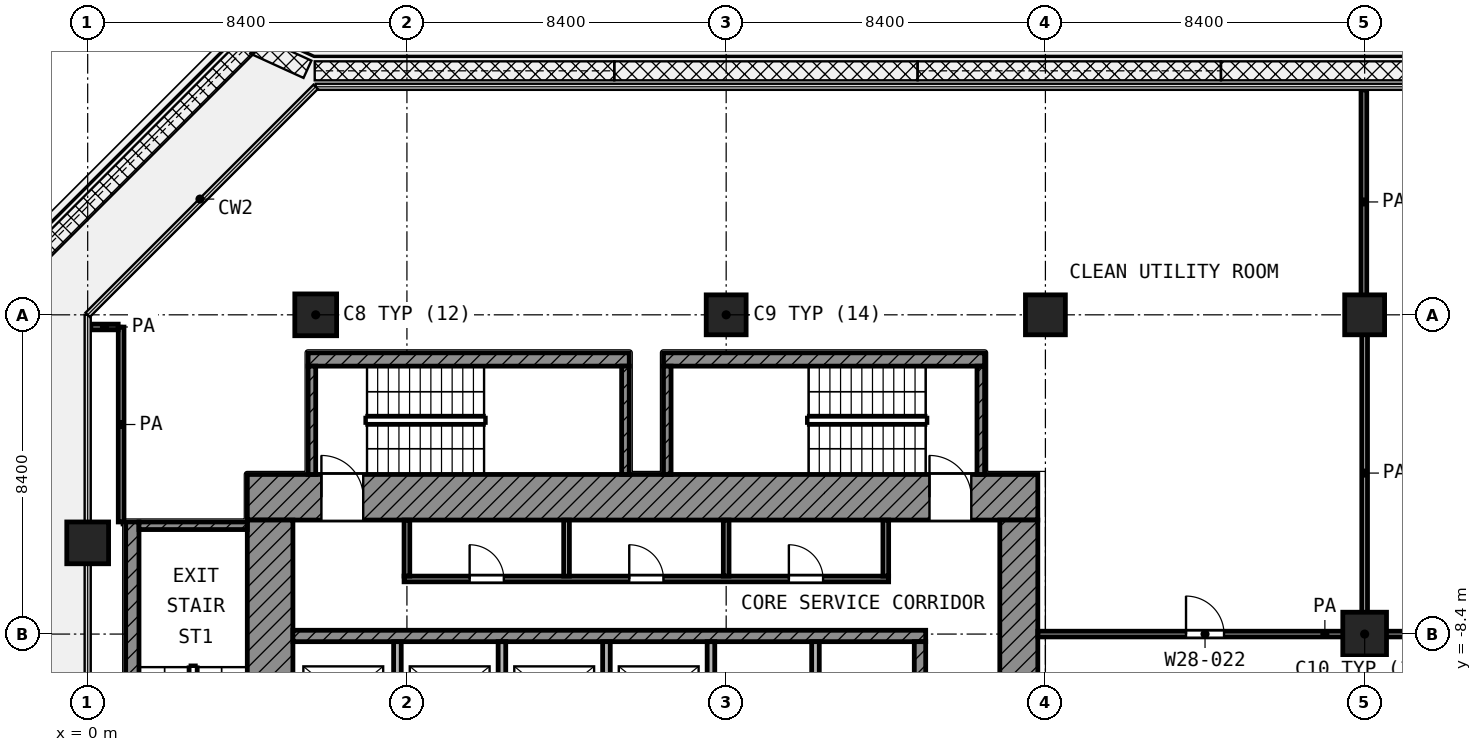
"""IFC4 building model, lengths in metres.
Left out: names, types, materials, properties, quantities, classifications, styles, units other than length and angle.
Written with IfcOpenShell. Run it as: python <this file> out.ifc"""

import sys

from ifc_helpers import new_model, si_unit, direction, frame, frame_2d, origin, origin_2d, place, context, subcontext, project, spatial, rectangle, extrude, element, fill, save


model = new_model("IFC4")
c1 = context("Model", 3, precision=1e-05, world=origin(), true_north=direction((0.0, 1.0)))
c2 = subcontext(c1, "Body", "Model", "MODEL_VIEW")
j1 = project(units=[si_unit("LENGTHUNIT", "METRE"), si_unit("PLANEANGLEUNIT", "RADIAN")], contexts=[c1])
p1 = place(None, origin())
s1 = spatial("IfcSite", under=j1, at=p1, CompositionType="ELEMENT")
p2 = place(p1, origin())
s2 = spatial("IfcBuilding", under=s1, at=p2, CompositionType="ELEMENT")
p3 = place(p2, frame((0.0, 0.0, 124.0)))
s3 = spatial("IfcBuildingStorey", under=s2, at=p3, CompositionType="ELEMENT", Elevation=124.0)
p4 = place(p3, frame((6.0, 0.0, 0.0), z_axis=(0.0, 0.0, 1.0), x_axis=(1.0, 0.0, 0.0)))
e1 = element("IfcColumn", 1, at=p4, inside=s3, PredefinedType="COLUMN", context=c2, shape_type="SweptSolid", body=[
    extrude(rectangle(XDim=1.1, YDim=1.1, at=origin_2d()), origin(), (0.0, 0.0, 1.0), 4.2),
])
for number, where, z_axis, x_axis in (
    (2, (16.8, 0.0, 0.0), (0.0, 0.0, 1.0), (1.0, 0.0, 0.0)),
    (3, (25.2, 0.0, 0.0), (0.0, 0.0, 1.0), (1.0, 0.0, 0.0)),
    (4, (33.6, 0.0, 0.0), (0.0, 0.0, 1.0), (1.0, 0.0, 0.0)),
):
    element("IfcColumn", number, at=place(p3, frame(where, z_axis=z_axis, x_axis=x_axis)), inside=s3, PredefinedType="COLUMN", context=c2, shape_type="SweptSolid", body=[
        extrude(rectangle(XDim=1.05, YDim=1.05, at=origin_2d()), origin(), (0.0, 0.0, 1.0), 4.2),
    ])
p5 = place(p3, frame((0.0, -6.0, 0.0), z_axis=(0.0, 0.0, 1.0), x_axis=(1.0, 0.0, 0.0)))
e5 = element("IfcColumn", 5, at=p5, inside=s3, PredefinedType="COLUMN", context=c2, shape_type="SweptSolid", body=[
    extrude(rectangle(XDim=1.1, YDim=1.1, at=origin_2d()), origin(), (0.0, 0.0, 1.0), 4.2),
])
p6 = place(p3, frame((33.6, -8.4, 0.0), z_axis=(0.0, 0.0, 1.0), x_axis=(1.0, 0.0, 0.0)))
e6 = element("IfcColumn", 6, at=p6, inside=s3, PredefinedType="COLUMN", context=c2, shape_type="SweptSolid", body=[
    extrude(rectangle(XDim=1.15, YDim=1.15, at=origin_2d()), origin(), (0.0, 0.0, 1.0), 4.2),
])
p7 = place(p3, frame((4.2, -4.8, 0.0), z_axis=(0.0, 0.0, 1.0), x_axis=(1.0, 0.0, 0.0)))
e7 = element("IfcWall", 7, at=p7, inside=s3, PredefinedType="SHEAR", context=c2, shape_type="SweptSolid", body=[
    extrude(rectangle(XDim=20.8, YDim=1.2, at=frame_2d((10.4, 0.0))), origin(), (0.0, 0.0, 1.0), 3.6),
])
p8 = place(p7, frame((1.95, 0.0, 0.0)))
e8 = element("IfcOpeningElement", 8, at=p8, cuts=e7, PredefinedType="OPENING", context=c2, shape_type="SweptSolid", body=[
    extrude(rectangle(XDim=1.1, YDim=2.1, at=frame_2d((0.55, 1.05))), frame((0.0, 0.61, 0.0), z_axis=(0.0, -1.0, 0.0), x_axis=(1.0, 0.0, 0.0)), (0.0, 0.0, 1.0), 1.22),
])
p9 = place(p7, frame((17.95, 0.0, 0.0)))
e9 = element("IfcOpeningElement", 9, at=p9, cuts=e7, PredefinedType="OPENING", context=c2, shape_type="SweptSolid", body=[
    extrude(rectangle(XDim=1.1, YDim=2.1, at=frame_2d((0.55, 1.05))), frame((0.0, 0.61, 0.0), z_axis=(0.0, -1.0, 0.0), x_axis=(1.0, 0.0, 0.0)), (0.0, 0.0, 1.0), 1.22),
])
p10 = place(p3, frame((4.8, -25.0, 0.0), z_axis=(0.0, 0.0, 1.0), x_axis=(0.0, 1.0, 0.0)))
e10 = element("IfcWall", 10, at=p10, inside=s3, PredefinedType="SHEAR", context=c2, shape_type="SweptSolid", body=[
    extrude(rectangle(XDim=19.6, YDim=1.2, at=frame_2d((9.8, 0.0))), origin(), (0.0, 0.0, 1.0), 3.6),
])
p11 = place(p10, frame((11.45, 0.0, 0.0)))
e11 = element("IfcOpeningElement", 11, at=p11, cuts=e10, PredefinedType="OPENING", context=c2, shape_type="SweptSolid", body=[
    extrude(rectangle(XDim=1.1, YDim=2.1, at=frame_2d((0.55, 1.05))), frame((0.0, 0.61, 0.0), z_axis=(0.0, -1.0, 0.0), x_axis=(1.0, 0.0, 0.0)), (0.0, 0.0, 1.0), 1.22),
])
p12 = place(p10, frame((2.15, 0.0, 0.0)))
e12 = element("IfcOpeningElement", 12, at=p12, cuts=e10, PredefinedType="OPENING", context=c2, shape_type="SweptSolid", body=[
    extrude(rectangle(XDim=1.1, YDim=2.1, at=frame_2d((0.55, 1.05))), frame((0.0, 0.61, 0.0), z_axis=(0.0, -1.0, 0.0), x_axis=(1.0, 0.0, 0.0)), (0.0, 0.0, 1.0), 1.22),
])
p13 = place(p3, frame((24.5, -24.0, 0.0), z_axis=(0.0, 0.0, 1.0), x_axis=(0.0, 1.0, 0.0)))
e13 = element("IfcWall", 13, at=p13, inside=s3, PredefinedType="SHEAR", context=c2, shape_type="SweptSolid", body=[
    extrude(rectangle(XDim=18.6, YDim=1.0, at=frame_2d((9.3, 0.0))), origin(), (0.0, 0.0, 1.0), 3.6),
])
p14 = place(p13, frame((10.5, 0.0, 0.0)))
e14 = element("IfcOpeningElement", 14, at=p14, cuts=e13, PredefinedType="OPENING", context=c2, shape_type="SweptSolid", body=[
    extrude(rectangle(XDim=1.8, YDim=2.1, at=frame_2d((0.9, 1.05))), frame((0.0, 0.51, 0.0), z_axis=(0.0, -1.0, 0.0), x_axis=(1.0, 0.0, 0.0)), (0.0, 0.0, 1.0), 1.02),
])
p15 = place(p3, frame((5.4, -8.45, 0.0), z_axis=(0.0, 0.0, 1.0), x_axis=(1.0, 0.0, 0.0)))
e15 = element("IfcWall", 15, at=p15, inside=s3, PredefinedType="SHEAR", context=c2, shape_type="SweptSolid", body=[
    extrude(rectangle(XDim=16.65, YDim=0.3, at=frame_2d((8.325, 0.0))), origin(), (0.0, 0.0, 1.0), 3.6),
])
p16 = place(p3, frame((21.9, -10.95, 0.0), z_axis=(0.0, 0.0, 1.0), x_axis=(0.0, 1.0, 0.0)))
e16 = element("IfcWall", 16, at=p16, inside=s3, PredefinedType="SHEAR", context=c2, shape_type="SweptSolid", body=[
    extrude(rectangle(XDim=2.35, YDim=0.3, at=frame_2d((1.175, 0.0))), origin(), (0.0, 0.0, 1.0), 3.6),
])
for number, where, z_axis, x_axis in (
    (17, (8.15, -10.95, 0.0), (0.0, 0.0, 1.0), (0.0, 1.0, 0.0)),
    (18, (10.9, -10.95, 0.0), (0.0, 0.0, 1.0), (0.0, 1.0, 0.0)),
    (19, (13.65, -10.95, 0.0), (0.0, 0.0, 1.0), (0.0, 1.0, 0.0)),
    (20, (16.4, -10.95, 0.0), (0.0, 0.0, 1.0), (0.0, 1.0, 0.0)),
    (21, (19.15, -10.95, 0.0), (0.0, 0.0, 1.0), (0.0, 1.0, 0.0)),
):
    element("IfcWall", number, at=place(p3, frame(where, z_axis=z_axis, x_axis=x_axis)), inside=s3, PredefinedType="PARTITIONING", context=c2, shape_type="SweptSolid", body=[
        extrude(rectangle(XDim=2.35, YDim=0.2, at=frame_2d((1.175, 0.0))), origin(), (0.0, 0.0, 1.0), 3.6),
    ])
p17 = place(p3, frame((8.325, -6.95, 0.0), z_axis=(0.0, 0.0, 1.0), x_axis=(1.0, 0.0, 0.0)))
e22 = element("IfcWall", 22, at=p17, inside=s3, PredefinedType="PARTITIONING", context=c2, shape_type="SweptSolid", body=[
    extrude(rectangle(XDim=12.75, YDim=0.15, at=frame_2d((6.375, 0.0))), origin(), (0.0, 0.0, 1.0), 3.6),
])
p18 = place(p17, frame((1.725, 0.0, 0.0)))
e23 = element("IfcOpeningElement", 23, at=p18, cuts=e22, PredefinedType="OPENING", context=c2, shape_type="SweptSolid", body=[
    extrude(rectangle(XDim=0.9, YDim=2.1, at=frame_2d((0.45, 1.05))), frame((0.0, 0.085, 0.0), z_axis=(0.0, -1.0, 0.0), x_axis=(1.0, 0.0, 0.0)), (0.0, 0.0, 1.0), 0.17),
])
p19 = place(p17, frame((5.925, 0.0, 0.0)))
e24 = element("IfcOpeningElement", 24, at=p19, cuts=e22, PredefinedType="OPENING", context=c2, shape_type="SweptSolid", body=[
    extrude(rectangle(XDim=0.9, YDim=2.1, at=frame_2d((0.45, 1.05))), frame((0.0, 0.085, 0.0), z_axis=(0.0, -1.0, 0.0), x_axis=(1.0, 0.0, 0.0)), (0.0, 0.0, 1.0), 0.17),
])
p20 = place(p17, frame((10.125, 0.0, 0.0)))
e25 = element("IfcOpeningElement", 25, at=p20, cuts=e22, PredefinedType="OPENING", context=c2, shape_type="SweptSolid", body=[
    extrude(rectangle(XDim=0.9, YDim=2.1, at=frame_2d((0.45, 1.05))), frame((0.0, 0.085, 0.0), z_axis=(0.0, -1.0, 0.0), x_axis=(1.0, 0.0, 0.0)), (0.0, 0.0, 1.0), 0.17),
])
for number, where, z_axis, x_axis in (
    (26, (8.4, -6.875, 0.0), (0.0, 0.0, 1.0), (0.0, 1.0, 0.0)),
    (27, (12.6, -6.875, 0.0), (0.0, 0.0, 1.0), (0.0, 1.0, 0.0)),
    (28, (16.8, -6.875, 0.0), (0.0, 0.0, 1.0), (0.0, 1.0, 0.0)),
    (29, (21.0, -6.875, 0.0), (0.0, 0.0, 1.0), (0.0, 1.0, 0.0)),
):
    element("IfcWall", number, at=place(p3, frame(where, z_axis=z_axis, x_axis=x_axis)), inside=s3, PredefinedType="PARTITIONING", context=c2, shape_type="SweptSolid", body=[
        extrude(rectangle(XDim=1.475, YDim=0.15, at=frame_2d((0.738, 0.0))), origin(), (0.0, 0.0, 1.0), 3.6),
    ])
p21 = place(p3, frame((1.175, -13.9, 0.0), z_axis=(0.0, 0.0, 1.0), x_axis=(0.0, 1.0, 0.0)))
e30 = element("IfcWall", 30, at=p21, inside=s3, PredefinedType="SHEAR", context=c2, shape_type="SweptSolid", body=[
    extrude(rectangle(XDim=8.45, YDim=0.35, at=frame_2d((4.225, 0.0))), origin(), (0.0, 0.0, 1.0), 3.6),
])
p22 = place(p3, frame((1.35, -5.55, 0.0), z_axis=(0.0, 0.0, 1.0), x_axis=(1.0, 0.0, 0.0)))
e31 = element("IfcWall", 31, at=p22, inside=s3, PredefinedType="SHEAR", context=c2, shape_type="SweptSolid", body=[
    extrude(rectangle(XDim=2.85, YDim=0.2, at=frame_2d((1.425, 0.0))), origin(), (0.0, 0.0, 1.0), 3.6),
])
p23 = place(p3, frame((5.8, -1.175, 0.0), z_axis=(0.0, 0.0, 1.0), x_axis=(1.0, 0.0, 0.0)))
e32 = element("IfcWall", 32, at=p23, inside=s3, PredefinedType="SHEAR", context=c2, shape_type="SweptSolid", body=[
    extrude(rectangle(XDim=8.45, YDim=0.35, at=frame_2d((4.225, 0.0))), origin(), (0.0, 0.0, 1.0), 3.6),
])
for number, where, z_axis, x_axis in (
    (33, (5.9, -4.2, 0.0), (0.0, 0.0, 1.0), (0.0, 1.0, 0.0)),
    (34, (14.15, -4.2, 0.0), (0.0, 0.0, 1.0), (0.0, 1.0, 0.0)),
):
    element("IfcWall", number, at=place(p3, frame(where, z_axis=z_axis, x_axis=x_axis)), inside=s3, PredefinedType="SHEAR", context=c2, shape_type="SweptSolid", body=[
        extrude(rectangle(XDim=2.85, YDim=0.2, at=frame_2d((1.425, 0.0))), origin(), (0.0, 0.0, 1.0), 3.6),
    ])
p24 = place(p3, frame((15.15, -1.175, 0.0), z_axis=(0.0, 0.0, 1.0), x_axis=(1.0, 0.0, 0.0)))
e35 = element("IfcWall", 35, at=p24, inside=s3, PredefinedType="SHEAR", context=c2, shape_type="SweptSolid", body=[
    extrude(rectangle(XDim=8.45, YDim=0.35, at=frame_2d((4.225, 0.0))), origin(), (0.0, 0.0, 1.0), 3.6),
])
for number, where, z_axis, x_axis in (
    (36, (15.25, -4.2, 0.0), (0.0, 0.0, 1.0), (0.0, 1.0, 0.0)),
    (37, (23.5, -4.2, 0.0), (0.0, 0.0, 1.0), (0.0, 1.0, 0.0)),
):
    element("IfcWall", number, at=place(p3, frame(where, z_axis=z_axis, x_axis=x_axis)), inside=s3, PredefinedType="SHEAR", context=c2, shape_type="SweptSolid", body=[
        extrude(rectangle(XDim=2.85, YDim=0.2, at=frame_2d((1.425, 0.0))), origin(), (0.0, 0.0, 1.0), 3.6),
    ])
p25 = place(p3, frame((25.0, -8.4, 0.0), z_axis=(0.0, 0.0, 1.0), x_axis=(1.0, 0.0, 0.0)))
e38 = element("IfcWall", 38, at=p25, inside=s3, PredefinedType="PARTITIONING", context=c2, shape_type="SweptSolid", body=[
    extrude(rectangle(XDim=15.107, YDim=0.15, at=frame_2d((7.553, 0.0))), origin(), (0.0, 0.0, 1.0), 3.6),
])
p26 = place(p25, frame((3.9, 0.0, 0.0)))
e39 = element("IfcOpeningElement", 39, at=p26, cuts=e38, PredefinedType="OPENING", context=c2, shape_type="SweptSolid", body=[
    extrude(rectangle(XDim=1.0, YDim=2.1, at=frame_2d((0.5, 1.05))), frame((0.0, 0.085, 0.0), z_axis=(0.0, -1.0, 0.0), x_axis=(1.0, 0.0, 0.0)), (0.0, 0.0, 1.0), 0.17),
])
p27 = place(p25, frame((10.1, 0.0, 0.0)))
e40 = element("IfcOpeningElement", 40, at=p27, cuts=e38, PredefinedType="OPENING", context=c2, shape_type="SweptSolid", body=[
    extrude(rectangle(XDim=1.2, YDim=2.1, at=frame_2d((0.6, 1.05))), frame((0.0, 0.085, 0.0), z_axis=(0.0, -1.0, 0.0), x_axis=(1.0, 0.0, 0.0)), (0.0, 0.0, 1.0), 0.17),
])
p28 = place(p3, frame((0.08, -0.32, 0.0), z_axis=(0.0, 0.0, 1.0), x_axis=(1.0, 0.0, 0.0)))
e41 = element("IfcWall", 41, at=p28, inside=s3, PredefinedType="PARTITIONING", context=c2, shape_type="SweptSolid", body=[
    extrude(rectangle(XDim=0.723, YDim=0.15, at=frame_2d((0.361, 0.0))), origin(), (0.0, 0.0, 1.0), 3.6),
])
p29 = place(p3, frame((0.88, -5.45, 0.0), z_axis=(0.0, 0.0, 1.0), x_axis=(0.0, 1.0, 0.0)))
e42 = element("IfcWall", 42, at=p29, inside=s3, PredefinedType="PARTITIONING", context=c2, shape_type="SweptSolid", body=[
    extrude(rectangle(XDim=5.128, YDim=0.15, at=frame_2d((2.564, 0.0))), origin(), (0.0, 0.0, 1.0), 3.6),
])
p30 = place(p3, frame((33.58, 0.02, 0.0), z_axis=(0.0, 0.0, 1.0), x_axis=(0.0, 1.0, 0.0)))
e43 = element("IfcWall", 43, at=p30, inside=s3, PredefinedType="PARTITIONING", context=c2, shape_type="SweptSolid", body=[
    extrude(rectangle(XDim=5.9, YDim=0.15, at=frame_2d((2.95, 0.0))), origin(), (0.0, 0.0, 1.0), 3.6),
])
p31 = place(p3, frame((33.6, -8.325, 0.0), z_axis=(0.0, 0.0, 1.0), x_axis=(0.0, 1.0, 0.0)))
e44 = element("IfcWall", 44, at=p31, inside=s3, PredefinedType="PARTITIONING", context=c2, shape_type="SweptSolid", body=[
    extrude(rectangle(XDim=8.322, YDim=0.15, at=frame_2d((4.161, 0.0))), origin(), (0.0, 0.0, 1.0), 3.6),
])
p32 = place(p8, origin())
e45 = element("IfcDoor", 45, at=p32, inside=s3, OperationType="SINGLE_SWING_LEFT", PredefinedType="DOOR", context=c2, shape_type="SweptSolid", body=[
    extrude(rectangle(XDim=1.1, YDim=2.1, at=frame_2d((0.55, 1.05))), frame((0.0, 0.025, 0.0), z_axis=(0.0, -1.0, 0.0), x_axis=(1.0, 0.0, 0.0)), (0.0, 0.0, 1.0), 0.05),
])
fill(e8, e45)
p33 = place(p9, origin())
e46 = element("IfcDoor", 46, at=p33, inside=s3, OperationType="SINGLE_SWING_LEFT", PredefinedType="DOOR", context=c2, shape_type="SweptSolid", body=[
    extrude(rectangle(XDim=1.1, YDim=2.1, at=frame_2d((0.55, 1.05))), frame((0.0, 0.025, 0.0), z_axis=(0.0, -1.0, 0.0), x_axis=(1.0, 0.0, 0.0)), (0.0, 0.0, 1.0), 0.05),
])
fill(e9, e46)
p34 = place(p18, origin())
e47 = element("IfcDoor", 47, at=p34, inside=s3, OperationType="SINGLE_SWING_LEFT", PredefinedType="DOOR", context=c2, shape_type="SweptSolid", body=[
    extrude(rectangle(XDim=0.9, YDim=2.1, at=frame_2d((0.45, 1.05))), frame((0.0, 0.025, 0.0), z_axis=(0.0, -1.0, 0.0), x_axis=(1.0, 0.0, 0.0)), (0.0, 0.0, 1.0), 0.05),
])
fill(e23, e47)
p35 = place(p19, origin())
e48 = element("IfcDoor", 48, at=p35, inside=s3, OperationType="SINGLE_SWING_LEFT", PredefinedType="DOOR", context=c2, shape_type="SweptSolid", body=[
    extrude(rectangle(XDim=0.9, YDim=2.1, at=frame_2d((0.45, 1.05))), frame((0.0, 0.025, 0.0), z_axis=(0.0, -1.0, 0.0), x_axis=(1.0, 0.0, 0.0)), (0.0, 0.0, 1.0), 0.05),
])
fill(e24, e48)
p36 = place(p20, origin())
e49 = element("IfcDoor", 49, at=p36, inside=s3, OperationType="SINGLE_SWING_LEFT", PredefinedType="DOOR", context=c2, shape_type="SweptSolid", body=[
    extrude(rectangle(XDim=0.9, YDim=2.1, at=frame_2d((0.45, 1.05))), frame((0.0, 0.025, 0.0), z_axis=(0.0, -1.0, 0.0), x_axis=(1.0, 0.0, 0.0)), (0.0, 0.0, 1.0), 0.05),
])
fill(e25, e49)
p37 = place(p26, origin())
e50 = element("IfcDoor", 50, at=p37, inside=s3, OperationType="SINGLE_SWING_LEFT", PredefinedType="DOOR", context=c2, shape_type="SweptSolid", body=[
    extrude(rectangle(XDim=1.0, YDim=2.1, at=frame_2d((0.5, 1.05))), frame((0.0, 0.025, 0.0), z_axis=(0.0, -1.0, 0.0), x_axis=(1.0, 0.0, 0.0)), (0.0, 0.0, 1.0), 0.05),
])
fill(e39, e50)
save(model, sys.argv[1])
